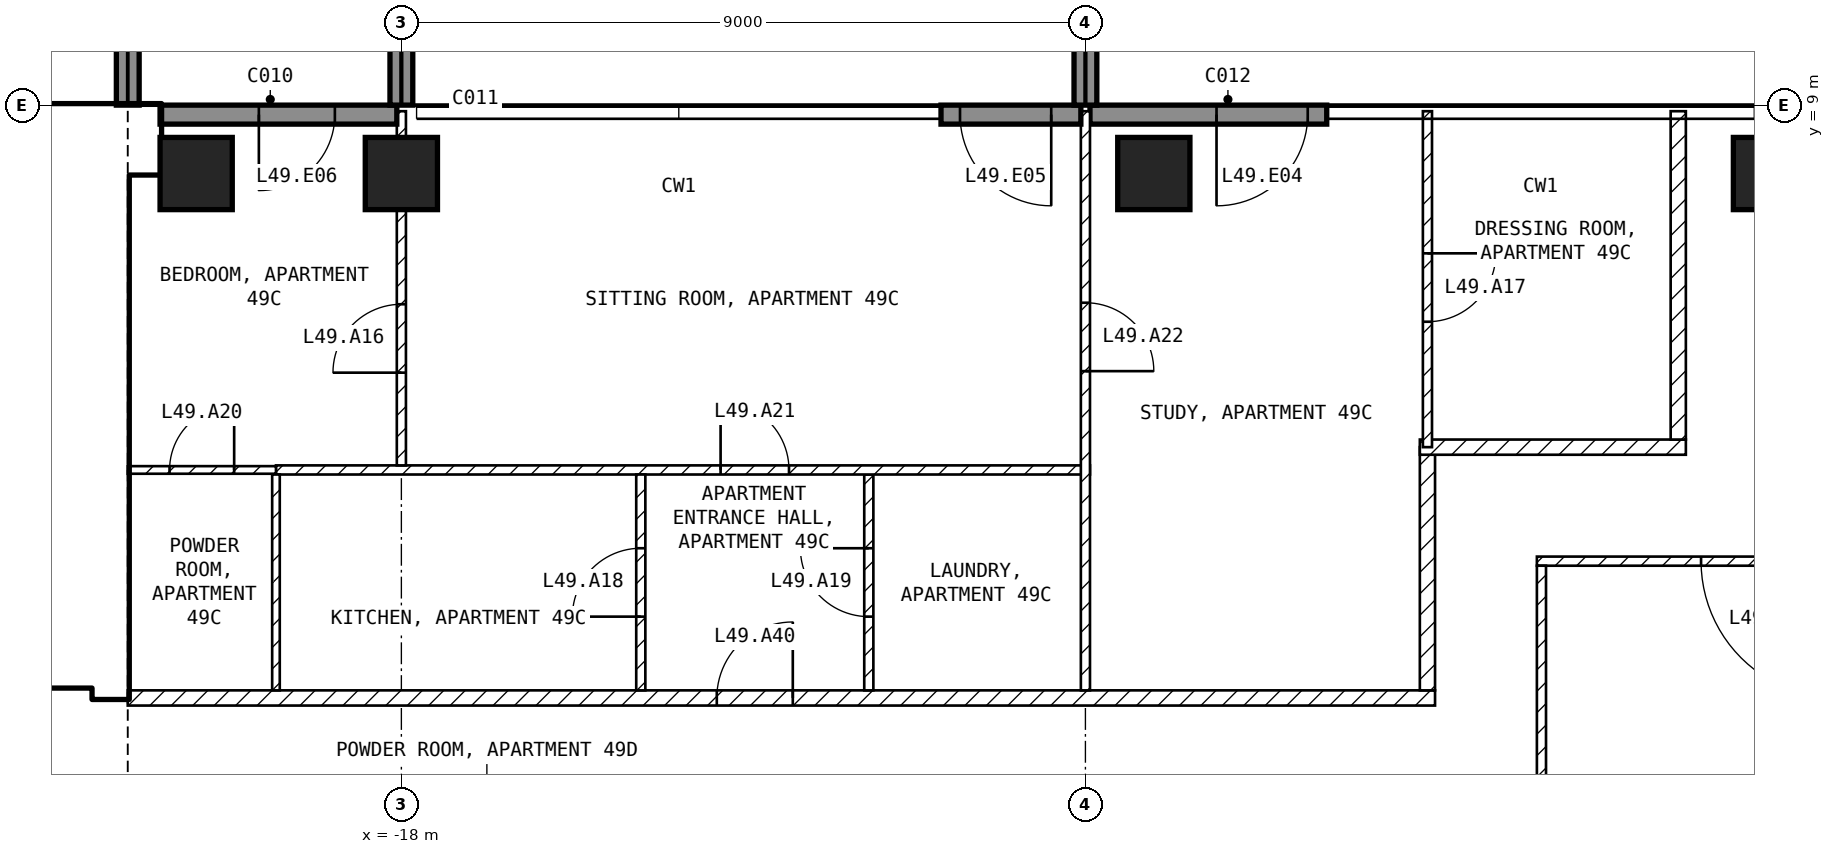
"""IFC4 building model, lengths in metres.
Left out: names, types, materials, properties, quantities, classifications, styles, units other than length and angle.
Written with IfcOpenShell. Run it as: python <this file> out.ifc"""

import sys

from ifc_helpers import new_model, si_unit, direction, frame, frame_2d, origin, origin_2d, place, context, subcontext, project, spatial, rectangle, extrude, element, fill, save


model = new_model("IFC4")
c1 = context("Model", 3, precision=1e-05, world=origin(), true_north=direction((0.0, 1.0)))
c2 = subcontext(c1, "Body", "Model", "MODEL_VIEW")
j1 = project(units=[si_unit("LENGTHUNIT", "METRE"), si_unit("PLANEANGLEUNIT", "RADIAN")], contexts=[c1])
p1 = place(None, origin())
s1 = spatial("IfcSite", under=j1, at=p1, CompositionType="ELEMENT")
p2 = place(p1, origin())
s2 = spatial("IfcBuilding", under=s1, at=p2, CompositionType="ELEMENT")
p3 = place(p2, frame((0.0, 0.0, 198.1)))
s3 = spatial("IfcBuildingStorey", under=s2, at=p3, CompositionType="ELEMENT", Elevation=198.1)
for number, where, z_axis, x_axis in (
    (1, (-20.7, 8.1, -0.25), (0.0, 0.0, 1.0), (1.0, 0.0, 0.0)),
    (2, (-18.0, 8.1, -0.25), (0.0, 0.0, 1.0), (1.0, 0.0, 0.0)),
    (3, (-8.1, 8.1, -0.25), (0.0, 0.0, 1.0), (1.0, 0.0, 0.0)),
    (4, (0.0, 8.1, -0.25), (0.0, 0.0, 1.0), (1.0, 0.0, 0.0)),
):
    element("IfcColumn", number, at=place(p3, frame(where, z_axis=z_axis, x_axis=x_axis)), inside=s3, PredefinedType="COLUMN", context=c2, shape_type="SweptSolid", body=[
        extrude(rectangle(XDim=0.95, YDim=0.95, at=origin_2d()), origin(), (0.0, 0.0, 1.0), 3.5),
    ])
p4 = place(p3, frame((-5.825, 8.875, 0.0), z_axis=(0.0, 0.0, 1.0), x_axis=(-1.0, 0.0, 0.0)))
e5 = element("IfcWall", 5, at=p4, inside=s3, PredefinedType="SOLIDWALL", context=c2, shape_type="SweptSolid", body=[
    extrude(rectangle(XDim=3.115, YDim=0.25, at=frame_2d((1.558, 0.0))), origin(), (0.0, 0.0, 1.0), 3.25),
])
p5 = place(p4, frame((0.25, 0.0, 0.0)))
e6 = element("IfcOpeningElement", 6, at=p5, cuts=e5, PredefinedType="OPENING", context=c2, shape_type="SweptSolid", body=[
    extrude(rectangle(XDim=1.2, YDim=2.4, at=frame_2d((0.6, 1.2))), frame((0.0, 0.135, 0.0), z_axis=(0.0, -1.0, 0.0), x_axis=(1.0, 0.0, 0.0)), (0.0, 0.0, 1.0), 0.27),
])
p6 = place(p3, frame((-9.06, 8.875, 0.0), z_axis=(0.0, 0.0, 1.0), x_axis=(-1.0, 0.0, 0.0)))
e7 = element("IfcWall", 7, at=p6, inside=s3, PredefinedType="SOLIDWALL", context=c2, shape_type="SweptSolid", body=[
    extrude(rectangle(XDim=1.84, YDim=0.25, at=frame_2d((0.92, 0.0))), origin(), (0.0, 0.0, 1.0), 3.25),
])
p7 = place(p6, frame((0.39, 0.0, 0.0)))
e8 = element("IfcOpeningElement", 8, at=p7, cuts=e7, PredefinedType="OPENING", context=c2, shape_type="SweptSolid", body=[
    extrude(rectangle(XDim=1.2, YDim=2.4, at=frame_2d((0.6, 1.2))), frame((0.0, 0.135, 0.0), z_axis=(0.0, -1.0, 0.0), x_axis=(1.0, 0.0, 0.0)), (0.0, 0.0, 1.0), 0.27),
])
p8 = place(p3, frame((-18.06, 8.875, 0.0), z_axis=(0.0, 0.0, 1.0), x_axis=(-1.0, 0.0, 0.0)))
e9 = element("IfcWall", 9, at=p8, inside=s3, PredefinedType="SOLIDWALL", context=c2, shape_type="SweptSolid", body=[
    extrude(rectangle(XDim=3.115, YDim=0.25, at=frame_2d((1.558, 0.0))), origin(), (0.0, 0.0, 1.0), 3.25),
])
p9 = place(p8, frame((0.815, 0.0, 0.0)))
e10 = element("IfcOpeningElement", 10, at=p9, cuts=e9, PredefinedType="OPENING", context=c2, shape_type="SweptSolid", body=[
    extrude(rectangle(XDim=1.0, YDim=2.4, at=frame_2d((0.5, 1.2))), frame((0.0, 0.135, 0.0), z_axis=(0.0, -1.0, 0.0), x_axis=(1.0, 0.0, 0.0)), (0.0, 0.0, 1.0), 0.27),
])
for number, where, z_axis, x_axis in (
    (11, (-21.6, 9.0, 0.0), (0.0, 0.0, 1.0), (0.0, 1.0, 0.0)),
    (12, (-18.0, 9.0, 0.0), (0.0, 0.0, 1.0), (0.0, 1.0, 0.0)),
    (13, (-9.0, 9.0, 0.0), (0.0, 0.0, 1.0), (0.0, 1.0, 0.0)),
):
    element("IfcWall", number, at=place(p3, frame(where, z_axis=z_axis, x_axis=x_axis)), inside=s3, PredefinedType="SOLIDWALL", context=c2, shape_type="SweptSolid", body=[
        extrude(rectangle(XDim=2.7, YDim=0.3, at=frame_2d((1.35, 0.0))), origin(), (0.0, 0.0, 1.0), 3.25),
    ])
p10 = place(p3, frame((-29.6, 8.55, 0.0), z_axis=(0.0, 0.0, 1.0), x_axis=(1.0, 0.0, 0.0)))
e14 = element("IfcWall", 14, at=p10, inside=s3, PredefinedType="SHEAR", context=c2, shape_type="SweptSolid", body=[
    extrude(rectangle(XDim=8.425, YDim=0.9, at=frame_2d((4.212, 0.0))), origin(), (0.0, 0.0, 1.0), 3.25),
])
p11 = place(p3, frame((-21.825, 1.2, 0.0), z_axis=(0.0, 0.0, 1.0), x_axis=(0.0, 1.0, 0.0)))
e15 = element("IfcWall", 15, at=p11, inside=s3, PredefinedType="SHEAR", context=c2, shape_type="SweptSolid", body=[
    extrude(rectangle(XDim=6.9, YDim=0.45, at=frame_2d((3.45, 0.0))), origin(), (0.0, 0.0, 1.0), 3.25),
])
p12 = place(p3, frame((-33.2, 1.45, 0.0), z_axis=(0.0, 0.0, 1.0), x_axis=(1.0, 0.0, 0.0)))
e16 = element("IfcWall", 16, at=p12, inside=s3, PredefinedType="SOLIDWALL", context=c2, shape_type="SweptSolid", body=[
    extrude(rectangle(XDim=11.15, YDim=0.2, at=frame_2d((5.575, 0.0))), origin(), (0.0, 0.0, 1.0), 3.25),
])
p13 = place(p12, frame((9.4, 0.0, 0.0)))
e17 = element("IfcOpeningElement", 17, at=p13, cuts=e16, PredefinedType="OPENING", context=c2, shape_type="SweptSolid", body=[
    extrude(rectangle(XDim=1.0, YDim=2.1, at=frame_2d((0.5, 1.05))), frame((0.0, 0.11, 0.0), z_axis=(0.0, -1.0, 0.0), x_axis=(1.0, 0.0, 0.0)), (0.0, 0.0, 1.0), 0.22),
])
p14 = place(p12, frame((6.9, 0.0, 0.0)))
e18 = element("IfcOpeningElement", 18, at=p14, cuts=e16, PredefinedType="OPENING", context=c2, shape_type="SweptSolid", body=[
    extrude(rectangle(XDim=1.0, YDim=2.1, at=frame_2d((0.5, 1.05))), frame((0.0, 0.11, 0.0), z_axis=(0.0, -1.0, 0.0), x_axis=(1.0, 0.0, 0.0)), (0.0, 0.0, 1.0), 0.22),
])
p15 = place(p12, frame((1.1, 0.0, 0.0)))
e19 = element("IfcOpeningElement", 19, at=p15, cuts=e16, PredefinedType="OPENING", context=c2, shape_type="SweptSolid", body=[
    extrude(rectangle(XDim=0.9, YDim=2.1, at=frame_2d((0.45, 1.05))), frame((0.0, 0.11, 0.0), z_axis=(0.0, -1.0, 0.0), x_axis=(1.0, 0.0, 0.0)), (0.0, 0.0, 1.0), 0.22),
])
p16 = place(p3, frame((-28.35, 5.15, 0.0), z_axis=(0.0, 0.0, 1.0), x_axis=(1.0, 0.0, 0.0)))
e20 = element("IfcWall", 20, at=p16, inside=s3, PredefinedType="SOLIDWALL", context=c2, shape_type="SweptSolid", body=[
    extrude(rectangle(XDim=6.3, YDim=0.2, at=frame_2d((3.15, 0.0))), origin(), (0.0, 0.0, 1.0), 3.25),
])
p17 = place(p16, frame((5.1, 0.0, 0.0)))
e21 = element("IfcOpeningElement", 21, at=p17, cuts=e20, PredefinedType="OPENING", context=c2, shape_type="SweptSolid", body=[
    extrude(rectangle(XDim=1.0, YDim=2.1, at=frame_2d((0.5, 1.05))), frame((0.0, 0.11, 0.0), z_axis=(0.0, -1.0, 0.0), x_axis=(1.0, 0.0, 0.0)), (0.0, 0.0, 1.0), 0.22),
])
p18 = place(p3, frame((3.06, 3.0, 0.0), z_axis=(0.0, 0.0, 1.0), x_axis=(-1.0, 0.0, 0.0)))
e22 = element("IfcWall", 22, at=p18, inside=s3, PredefinedType="PARTITIONING", context=c2, shape_type="SweptSolid", body=[
    extrude(rectangle(XDim=6.12, YDim=0.12, at=frame_2d((3.06, 0.0))), origin(), (0.0, 0.0, 1.0), 3.25),
])
p19 = place(p18, frame((2.16, 0.0, 0.0)))
e23 = element("IfcOpeningElement", 23, at=p19, cuts=e22, PredefinedType="OPENING", context=c2, shape_type="SweptSolid", body=[
    extrude(rectangle(XDim=1.8, YDim=2.1, at=frame_2d((0.9, 1.05))), frame((0.0, 0.07, 0.0), z_axis=(0.0, -1.0, 0.0), x_axis=(1.0, 0.0, 0.0)), (0.0, 0.0, 1.0), 0.14),
])
p20 = place(p3, frame((-3.0, 2.94, 0.0), z_axis=(0.0, 0.0, 1.0), x_axis=(0.0, -1.0, 0.0)))
e24 = element("IfcWall", 24, at=p20, inside=s3, PredefinedType="PARTITIONING", context=c2, shape_type="SweptSolid", body=[
    extrude(rectangle(XDim=5.88, YDim=0.12, at=frame_2d((2.94, 0.0))), origin(), (0.0, 0.0, 1.0), 3.25),
])
p21 = place(p3, frame((-21.6, 1.2, 0.0), z_axis=(0.0, 0.0, 1.0), x_axis=(1.0, 0.0, 0.0)))
e25 = element("IfcWall", 25, at=p21, inside=s3, PredefinedType="PARTITIONING", context=c2, shape_type="SweptSolid", body=[
    extrude(rectangle(XDim=17.2, YDim=0.2, at=frame_2d((8.6, 0.0))), origin(), (0.0, 0.0, 1.0), 3.25),
])
p22 = place(p21, frame((7.75, 0.0, 0.0)))
e26 = element("IfcOpeningElement", 26, at=p22, cuts=e25, PredefinedType="OPENING", context=c2, shape_type="SweptSolid", body=[
    extrude(rectangle(XDim=1.0, YDim=2.1, at=frame_2d((0.5, 1.05))), frame((0.0, 0.11, 0.0), z_axis=(0.0, -1.0, 0.0), x_axis=(1.0, 0.0, 0.0)), (0.0, 0.0, 1.0), 0.22),
])
p23 = place(p3, frame((-4.5, 1.3, 0.0), z_axis=(0.0, 0.0, 1.0), x_axis=(0.0, 1.0, 0.0)))
e27 = element("IfcWall", 27, at=p23, inside=s3, PredefinedType="PARTITIONING", context=c2, shape_type="SweptSolid", body=[
    extrude(rectangle(XDim=3.2, YDim=0.2, at=frame_2d((1.6, 0.0))), origin(), (0.0, 0.0, 1.0), 3.25),
])
p24 = place(p3, frame((-4.6, 4.5, 0.0), z_axis=(0.0, 0.0, 1.0), x_axis=(1.0, 0.0, 0.0)))
e28 = element("IfcWall", 28, at=p24, inside=s3, PredefinedType="PARTITIONING", context=c2, shape_type="SweptSolid", body=[
    extrude(rectangle(XDim=3.5, YDim=0.2, at=frame_2d((1.75, 0.0))), origin(), (0.0, 0.0, 1.0), 3.25),
])
p25 = place(p3, frame((-1.2, 4.6, 0.0), z_axis=(0.0, 0.0, 1.0), x_axis=(0.0, 1.0, 0.0)))
e29 = element("IfcWall", 29, at=p25, inside=s3, PredefinedType="PARTITIONING", context=c2, shape_type="SweptSolid", body=[
    extrude(rectangle(XDim=4.32, YDim=0.2, at=frame_2d((2.16, 0.0))), origin(), (0.0, 0.0, 1.0), 3.25),
])
p26 = place(p3, frame((-11.85, 1.3, 0.0), z_axis=(0.0, 0.0, 1.0), x_axis=(0.0, 1.0, 0.0)))
e30 = element("IfcWall", 30, at=p26, inside=s3, PredefinedType="PARTITIONING", context=c2, shape_type="SweptSolid", body=[
    extrude(rectangle(XDim=2.84, YDim=0.12, at=frame_2d((1.42, 0.0))), origin(), (0.0, 0.0, 1.0), 3.25),
])
p27 = place(p26, frame((0.97, 0.0, 0.0)))
e31 = element("IfcOpeningElement", 31, at=p27, cuts=e30, PredefinedType="OPENING", context=c2, shape_type="SweptSolid", body=[
    extrude(rectangle(XDim=0.9, YDim=2.1, at=frame_2d((0.45, 1.05))), frame((0.0, 0.07, 0.0), z_axis=(0.0, -1.0, 0.0), x_axis=(1.0, 0.0, 0.0)), (0.0, 0.0, 1.0), 0.14),
])
p28 = place(p3, frame((-19.65, 4.2, 0.0), z_axis=(0.0, 0.0, 1.0), x_axis=(1.0, 0.0, 0.0)))
e32 = element("IfcWall", 32, at=p28, inside=s3, PredefinedType="PARTITIONING", context=c2, shape_type="SweptSolid", body=[
    extrude(rectangle(XDim=10.71, YDim=0.12, at=frame_2d((5.355, 0.0))), origin(), (0.0, 0.0, 1.0), 3.25),
])
p29 = place(p28, frame((5.85, 0.0, 0.0)))
e33 = element("IfcOpeningElement", 33, at=p29, cuts=e32, PredefinedType="OPENING", context=c2, shape_type="SweptSolid", body=[
    extrude(rectangle(XDim=0.9, YDim=2.1, at=frame_2d((0.45, 1.05))), frame((0.0, 0.07, 0.0), z_axis=(0.0, -1.0, 0.0), x_axis=(1.0, 0.0, 0.0)), (0.0, 0.0, 1.0), 0.14),
])
p30 = place(p3, frame((-9.0, 8.92, 0.0), z_axis=(0.0, 0.0, 1.0), x_axis=(0.0, -1.0, 0.0)))
e34 = element("IfcWall", 34, at=p30, inside=s3, PredefinedType="PARTITIONING", context=c2, shape_type="SweptSolid", body=[
    extrude(rectangle(XDim=7.62, YDim=0.12, at=frame_2d((3.81, 0.0))), origin(), (0.0, 0.0, 1.0), 3.25),
])
p31 = place(p30, frame((2.52, 0.0, 0.0)))
e35 = element("IfcOpeningElement", 35, at=p31, cuts=e34, PredefinedType="OPENING", context=c2, shape_type="SweptSolid", body=[
    extrude(rectangle(XDim=0.9, YDim=2.1, at=frame_2d((0.45, 1.05))), frame((0.0, 0.07, 0.0), z_axis=(0.0, -1.0, 0.0), x_axis=(1.0, 0.0, 0.0)), (0.0, 0.0, 1.0), 0.14),
])
p32 = place(p3, frame((-14.85, 1.3, 0.0), z_axis=(0.0, 0.0, 1.0), x_axis=(0.0, 1.0, 0.0)))
e36 = element("IfcWall", 36, at=p32, inside=s3, PredefinedType="PARTITIONING", context=c2, shape_type="SweptSolid", body=[
    extrude(rectangle(XDim=2.84, YDim=0.12, at=frame_2d((1.42, 0.0))), origin(), (0.0, 0.0, 1.0), 3.25),
])
p33 = place(p32, frame((0.97, 0.0, 0.0)))
e37 = element("IfcOpeningElement", 37, at=p33, cuts=e36, PredefinedType="OPENING", context=c2, shape_type="SweptSolid", body=[
    extrude(rectangle(XDim=0.9, YDim=2.1, at=frame_2d((0.45, 1.05))), frame((0.0, 0.07, 0.0), z_axis=(0.0, -1.0, 0.0), x_axis=(1.0, 0.0, 0.0)), (0.0, 0.0, 1.0), 0.14),
])
p34 = place(p3, frame((-19.65, 1.3, 0.0), z_axis=(0.0, 0.0, 1.0), x_axis=(0.0, 1.0, 0.0)))
e38 = element("IfcWall", 38, at=p34, inside=s3, PredefinedType="PARTITIONING", context=c2, shape_type="SweptSolid", body=[
    extrude(rectangle(XDim=2.84, YDim=0.1, at=frame_2d((1.42, 0.0))), origin(), (0.0, 0.0, 1.0), 3.25),
])
p35 = place(p3, frame((-21.6, 4.2, 0.0), z_axis=(0.0, 0.0, 1.0), x_axis=(1.0, 0.0, 0.0)))
e39 = element("IfcWall", 39, at=p35, inside=s3, PredefinedType="PARTITIONING", context=c2, shape_type="SweptSolid", body=[
    extrude(rectangle(XDim=1.95, YDim=0.1, at=frame_2d((0.975, 0.0))), origin(), (0.0, 0.0, 1.0), 3.25),
])
p36 = place(p35, frame((0.55, 0.0, 0.0)))
e40 = element("IfcOpeningElement", 40, at=p36, cuts=e39, PredefinedType="OPENING", context=c2, shape_type="SweptSolid", body=[
    extrude(rectangle(XDim=0.85, YDim=2.1, at=frame_2d((0.425, 1.05))), frame((0.0, 0.06, 0.0), z_axis=(0.0, -1.0, 0.0), x_axis=(1.0, 0.0, 0.0)), (0.0, 0.0, 1.0), 0.12),
])
p37 = place(p3, frame((-18.0, 4.26, 0.0), z_axis=(0.0, 0.0, 1.0), x_axis=(0.0, 1.0, 0.0)))
e41 = element("IfcWall", 41, at=p37, inside=s3, PredefinedType="PARTITIONING", context=c2, shape_type="SweptSolid", body=[
    extrude(rectangle(XDim=4.66, YDim=0.12, at=frame_2d((2.33, 0.0))), origin(), (0.0, 0.0, 1.0), 2.48),
])
p38 = place(p37, frame((1.22, 0.0, 0.0)))
e42 = element("IfcOpeningElement", 42, at=p38, cuts=e41, PredefinedType="OPENING", context=c2, shape_type="SweptSolid", body=[
    extrude(rectangle(XDim=0.9, YDim=2.1, at=frame_2d((0.45, 1.05))), frame((0.0, 0.07, 0.0), z_axis=(0.0, -1.0, 0.0), x_axis=(1.0, 0.0, 0.0)), (0.0, 0.0, 1.0), 0.14),
])
p39 = place(p3, frame((-4.5, 8.92, 0.0), z_axis=(0.0, 0.0, 1.0), x_axis=(0.0, -1.0, 0.0)))
e43 = element("IfcWall", 43, at=p39, inside=s3, PredefinedType="PARTITIONING", context=c2, shape_type="SweptSolid", body=[
    extrude(rectangle(XDim=4.42, YDim=0.12, at=frame_2d((2.21, 0.0))), origin(), (0.0, 0.0, 1.0), 3.25),
])
p40 = place(p39, frame((1.87, 0.0, 0.0)))
e44 = element("IfcOpeningElement", 44, at=p40, cuts=e43, PredefinedType="OPENING", context=c2, shape_type="SweptSolid", body=[
    extrude(rectangle(XDim=0.9, YDim=2.1, at=frame_2d((0.45, 1.05))), frame((0.0, 0.07, 0.0), z_axis=(0.0, -1.0, 0.0), x_axis=(1.0, 0.0, 0.0)), (0.0, 0.0, 1.0), 0.14),
])
p41 = place(p5, origin())
e45 = element("IfcDoor", 45, at=p41, inside=s3, OperationType="SINGLE_SWING_RIGHT", PredefinedType="DOOR", context=c2, shape_type="SweptSolid", body=[
    extrude(rectangle(XDim=1.2, YDim=2.4, at=frame_2d((0.6, 1.2))), frame((0.0, 0.025, 0.0), z_axis=(0.0, -1.0, 0.0), x_axis=(1.0, 0.0, 0.0)), (0.0, 0.0, 1.0), 0.05),
])
fill(e6, e45)
p42 = place(p7, origin())
e46 = element("IfcDoor", 46, at=p42, inside=s3, OperationType="SINGLE_SWING_LEFT", PredefinedType="DOOR", context=c2, shape_type="SweptSolid", body=[
    extrude(rectangle(XDim=1.2, YDim=2.4, at=frame_2d((0.6, 1.2))), frame((0.0, 0.025, 0.0), z_axis=(0.0, -1.0, 0.0), x_axis=(1.0, 0.0, 0.0)), (0.0, 0.0, 1.0), 0.05),
])
fill(e8, e46)
p43 = place(p9, origin())
e47 = element("IfcDoor", 47, at=p43, inside=s3, OperationType="SINGLE_SWING_RIGHT", PredefinedType="DOOR", context=c2, shape_type="SweptSolid", body=[
    extrude(rectangle(XDim=1.0, YDim=2.4, at=frame_2d((0.5, 1.2))), frame((0.0, 0.025, 0.0), z_axis=(0.0, -1.0, 0.0), x_axis=(1.0, 0.0, 0.0)), (0.0, 0.0, 1.0), 0.05),
])
fill(e10, e47)
p44 = place(p17, origin())
e48 = element("IfcDoor", 48, at=p44, inside=s3, OperationType="SINGLE_SWING_LEFT", PredefinedType="DOOR", context=c2, shape_type="SweptSolid", body=[
    extrude(rectangle(XDim=1.0, YDim=2.1, at=frame_2d((0.5, 1.05))), frame((0.0, 0.025, 0.0), z_axis=(0.0, -1.0, 0.0), x_axis=(1.0, 0.0, 0.0)), (0.0, 0.0, 1.0), 0.05),
])
fill(e21, e48)
p45 = place(p19, origin())
e49 = element("IfcDoor", 49, at=p45, inside=s3, OperationType="SINGLE_SWING_LEFT", PredefinedType="DOOR", context=c2, shape_type="SweptSolid", body=[
    extrude(rectangle(XDim=1.8, YDim=2.1, at=frame_2d((0.9, 1.05))), frame((0.0, 0.025, 0.0), z_axis=(0.0, -1.0, 0.0), x_axis=(1.0, 0.0, 0.0)), (0.0, 0.0, 1.0), 0.05),
])
fill(e23, e49)
p46 = place(p38, origin())
e50 = element("IfcDoor", 50, at=p46, inside=s3, OperationType="SINGLE_SWING_LEFT", PredefinedType="DOOR", context=c2, shape_type="SweptSolid", body=[
    extrude(rectangle(XDim=0.9, YDim=2.1, at=frame_2d((0.45, 1.05))), frame((0.0, 0.025, 0.0), z_axis=(0.0, -1.0, 0.0), x_axis=(1.0, 0.0, 0.0)), (0.0, 0.0, 1.0), 0.05),
])
fill(e42, e50)
p47 = place(p40, origin())
e51 = element("IfcDoor", 51, at=p47, inside=s3, OperationType="SINGLE_SWING_LEFT", PredefinedType="DOOR", context=c2, shape_type="SweptSolid", body=[
    extrude(rectangle(XDim=0.9, YDim=2.1, at=frame_2d((0.45, 1.05))), frame((0.0, 0.025, 0.0), z_axis=(0.0, -1.0, 0.0), x_axis=(1.0, 0.0, 0.0)), (0.0, 0.0, 1.0), 0.05),
])
fill(e44, e51)
p48 = place(p33, origin())
e52 = element("IfcDoor", 52, at=p48, inside=s3, OperationType="SINGLE_SWING_LEFT", PredefinedType="DOOR", context=c2, shape_type="SweptSolid", body=[
    extrude(rectangle(XDim=0.9, YDim=2.1, at=frame_2d((0.45, 1.05))), frame((0.0, 0.025, 0.0), z_axis=(0.0, -1.0, 0.0), x_axis=(1.0, 0.0, 0.0)), (0.0, 0.0, 1.0), 0.05),
])
fill(e37, e52)
p49 = place(p27, origin())
e53 = element("IfcDoor", 53, at=p49, inside=s3, OperationType="SINGLE_SWING_RIGHT", PredefinedType="DOOR", context=c2, shape_type="SweptSolid", body=[
    extrude(rectangle(XDim=0.9, YDim=2.1, at=frame_2d((0.45, 1.05))), frame((0.0, 0.025, 0.0), z_axis=(0.0, -1.0, 0.0), x_axis=(1.0, 0.0, 0.0)), (0.0, 0.0, 1.0), 0.05),
])
fill(e31, e53)
p50 = place(p36, origin())
e54 = element("IfcDoor", 54, at=p50, inside=s3, OperationType="SINGLE_SWING_RIGHT", PredefinedType="DOOR", context=c2, shape_type="SweptSolid", body=[
    extrude(rectangle(XDim=0.85, YDim=2.1, at=frame_2d((0.425, 1.05))), frame((0.0, 0.025, 0.0), z_axis=(0.0, -1.0, 0.0), x_axis=(1.0, 0.0, 0.0)), (0.0, 0.0, 1.0), 0.05),
])
fill(e40, e54)
p51 = place(p29, origin())
e55 = element("IfcDoor", 55, at=p51, inside=s3, OperationType="SINGLE_SWING_LEFT", PredefinedType="DOOR", context=c2, shape_type="SweptSolid", body=[
    extrude(rectangle(XDim=0.9, YDim=2.1, at=frame_2d((0.45, 1.05))), frame((0.0, 0.025, 0.0), z_axis=(0.0, -1.0, 0.0), x_axis=(1.0, 0.0, 0.0)), (0.0, 0.0, 1.0), 0.05),
])
fill(e33, e55)
p52 = place(p31, origin())
e56 = element("IfcDoor", 56, at=p52, inside=s3, OperationType="SINGLE_SWING_RIGHT", PredefinedType="DOOR", context=c2, shape_type="SweptSolid", body=[
    extrude(rectangle(XDim=0.9, YDim=2.1, at=frame_2d((0.45, 1.05))), frame((0.0, 0.025, 0.0), z_axis=(0.0, -1.0, 0.0), x_axis=(1.0, 0.0, 0.0)), (0.0, 0.0, 1.0), 0.05),
])
fill(e35, e56)
p53 = place(p22, origin())
e57 = element("IfcDoor", 57, at=p53, inside=s3, OperationType="SINGLE_SWING_RIGHT", PredefinedType="DOOR", context=c2, shape_type="SweptSolid", body=[
    extrude(rectangle(XDim=1.0, YDim=2.1, at=frame_2d((0.5, 1.05))), frame((0.0, 0.025, 0.0), z_axis=(0.0, -1.0, 0.0), x_axis=(1.0, 0.0, 0.0)), (0.0, 0.0, 1.0), 0.05),
])
fill(e26, e57)
save(model, sys.argv[1])
